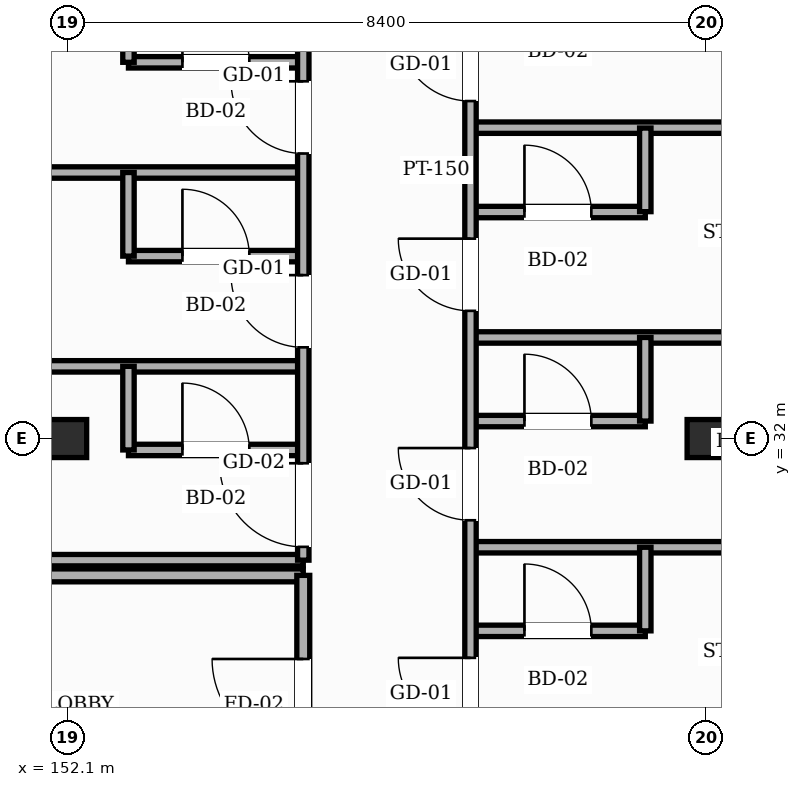
"""IFC4 building model, lengths in metres.
Left out: names, types, materials, properties, quantities, classifications, styles, units other than length and angle.
Written with IfcOpenShell. Run it as: python <this file> out.ifc"""

import sys

from ifc_helpers import new_model, si_unit, direction, frame, frame_2d, origin, origin_2d, place, context, subcontext, project, spatial, rectangle, hollow_rectangle, extrude, element, fill, save


model = new_model("IFC4")
c1 = context("Model", 3, precision=1e-05, world=origin(), true_north=direction((0.0, 1.0)))
c2 = subcontext(c1, "Body", "Model", "MODEL_VIEW")
j1 = project(units=[si_unit("LENGTHUNIT", "METRE"), si_unit("PLANEANGLEUNIT", "RADIAN")], contexts=[c1])
p1 = place(None, origin())
s1 = spatial("IfcSite", under=j1, at=p1, CompositionType="ELEMENT")
p2 = place(p1, origin())
s2 = spatial("IfcBuilding", under=s1, at=p2, CompositionType="ELEMENT")
p3 = place(p2, frame((0.0, 0.0, 35.4)))
s3 = spatial("IfcBuildingStorey", under=s2, at=p3, CompositionType="ELEMENT", Elevation=35.4)
for number, where, z_axis, x_axis in (
    (1, (152.1, 32.0, 0.0), (0.0, 0.0, 1.0), (1.0, 0.0, 0.0)),
    (2, (160.5, 32.0, 0.0), (0.0, 0.0, 1.0), (1.0, 0.0, 0.0)),
):
    element("IfcColumn", number, at=place(p3, frame(where, z_axis=z_axis, x_axis=x_axis)), inside=s3, PredefinedType="COLUMN", context=c2, shape_type="SweptSolid", body=[
        extrude(hollow_rectangle(XDim=0.5, YDim=0.5, WallThickness=0.022, InnerFilletRadius=0.022, OuterFilletRadius=0.044, at=origin_2d()), origin(), (0.0, 0.0, 1.0), 3.6),
    ])
p4 = place(p3, frame((157.4, 29.47, 0.0), z_axis=(0.0, 0.0, 1.0), x_axis=(1.0, 0.0, 0.0)))
e3 = element("IfcWall", 3, at=p4, inside=s3, PredefinedType="PARTITIONING", context=c2, shape_type="SweptSolid", body=[
    extrude(rectangle(XDim=2.3, YDim=0.15, at=frame_2d((1.15, 0.0))), origin(), (0.0, 0.0, 1.0), 3.365),
])
p5 = place(p4, frame((0.71, 0.0, 0.0)))
e4 = element("IfcOpeningElement", 4, at=p5, cuts=e3, PredefinedType="OPENING", context=c2, shape_type="SweptSolid", body=[
    extrude(rectangle(XDim=0.88, YDim=2.12, at=frame_2d((0.44, 1.06))), frame((0.0, 0.085, 0.0), z_axis=(0.0, -1.0, 0.0), x_axis=(1.0, 0.0, 0.0)), (0.0, 0.0, 1.0), 0.17),
])
p6 = place(p3, frame((147.8, 30.2, 0.0), z_axis=(0.0, 0.0, 1.0), x_axis=(1.0, 0.0, 0.0)))
e5 = element("IfcWall", 5, at=p6, inside=s3, PredefinedType="PARTITIONING", context=c2, shape_type="SweptSolid", body=[
    extrude(rectangle(XDim=7.4, YDim=0.17, at=frame_2d((3.7, 0.0))), origin(), (0.0, 0.0, 1.0), 3.365),
])
p7 = place(p3, frame((144.2, 30.4, 0.0), z_axis=(0.0, 0.0, 1.0), x_axis=(1.0, 0.0, 0.0)))
e6 = element("IfcWall", 6, at=p7, inside=s3, PredefinedType="PARTITIONING", context=c2, shape_type="SweptSolid", body=[
    extrude(rectangle(XDim=11.0, YDim=0.15, at=frame_2d((5.5, 0.0))), origin(), (0.0, 0.0, 1.0), 3.365),
])
p8 = place(p3, frame((157.4, 30.57, 0.0), z_axis=(0.0, 0.0, 1.0), x_axis=(1.0, 0.0, 0.0)))
e7 = element("IfcWall", 7, at=p8, inside=s3, PredefinedType="PARTITIONING", context=c2, shape_type="SweptSolid", body=[
    extrude(rectangle(XDim=9.8, YDim=0.15, at=frame_2d((4.9, 0.0))), origin(), (0.0, 0.0, 1.0), 3.365),
])
p9 = place(p3, frame((152.9, 31.85, 0.0), z_axis=(0.0, 0.0, 1.0), x_axis=(1.0, 0.0, 0.0)))
e8 = element("IfcWall", 8, at=p9, inside=s3, PredefinedType="PARTITIONING", context=c2, shape_type="SweptSolid", body=[
    extrude(rectangle(XDim=2.3, YDim=0.15, at=frame_2d((1.15, 0.0))), origin(), (0.0, 0.0, 1.0), 2.755),
])
p10 = place(p9, frame((0.71, 0.0, 0.0)))
e9 = element("IfcOpeningElement", 9, at=p10, cuts=e8, PredefinedType="OPENING", context=c2, shape_type="SweptSolid", body=[
    extrude(rectangle(XDim=0.88, YDim=2.12, at=frame_2d((0.44, 1.06))), frame((0.0, 0.085, 0.0), z_axis=(0.0, -1.0, 0.0), x_axis=(1.0, 0.0, 0.0)), (0.0, 0.0, 1.0), 0.17),
])
p11 = place(p3, frame((157.4, 32.23, 0.0), z_axis=(0.0, 0.0, 1.0), x_axis=(1.0, 0.0, 0.0)))
e10 = element("IfcWall", 10, at=p11, inside=s3, PredefinedType="PARTITIONING", context=c2, shape_type="SweptSolid", body=[
    extrude(rectangle(XDim=2.3, YDim=0.15, at=frame_2d((1.15, 0.0))), origin(), (0.0, 0.0, 1.0), 2.755),
])
p12 = place(p11, frame((0.71, 0.0, 0.0)))
e11 = element("IfcOpeningElement", 11, at=p12, cuts=e10, PredefinedType="OPENING", context=c2, shape_type="SweptSolid", body=[
    extrude(rectangle(XDim=0.88, YDim=2.12, at=frame_2d((0.44, 1.06))), frame((0.0, 0.085, 0.0), z_axis=(0.0, -1.0, 0.0), x_axis=(1.0, 0.0, 0.0)), (0.0, 0.0, 1.0), 0.17),
])
p13 = place(p3, frame((144.2, 32.95, 0.0), z_axis=(0.0, 0.0, 1.0), x_axis=(1.0, 0.0, 0.0)))
e12 = element("IfcWall", 12, at=p13, inside=s3, PredefinedType="PARTITIONING", context=c2, shape_type="SweptSolid", body=[
    extrude(rectangle(XDim=11.0, YDim=0.15, at=frame_2d((5.5, 0.0))), origin(), (0.0, 0.0, 1.0), 3.365),
])
p14 = place(p3, frame((157.4, 33.33, 0.0), z_axis=(0.0, 0.0, 1.0), x_axis=(1.0, 0.0, 0.0)))
e13 = element("IfcWall", 13, at=p14, inside=s3, PredefinedType="PARTITIONING", context=c2, shape_type="SweptSolid", body=[
    extrude(rectangle(XDim=9.8, YDim=0.15, at=frame_2d((4.9, 0.0))), origin(), (0.0, 0.0, 1.0), 3.365),
])
p15 = place(p3, frame((152.9, 34.4, 0.0), z_axis=(0.0, 0.0, 1.0), x_axis=(1.0, 0.0, 0.0)))
e14 = element("IfcWall", 14, at=p15, inside=s3, PredefinedType="PARTITIONING", context=c2, shape_type="SweptSolid", body=[
    extrude(rectangle(XDim=2.3, YDim=0.15, at=frame_2d((1.15, 0.0))), origin(), (0.0, 0.0, 1.0), 3.365),
])
p16 = place(p15, frame((0.71, 0.0, 0.0)))
e15 = element("IfcOpeningElement", 15, at=p16, cuts=e14, PredefinedType="OPENING", context=c2, shape_type="SweptSolid", body=[
    extrude(rectangle(XDim=0.88, YDim=2.12, at=frame_2d((0.44, 1.06))), frame((0.0, 0.085, 0.0), z_axis=(0.0, -1.0, 0.0), x_axis=(1.0, 0.0, 0.0)), (0.0, 0.0, 1.0), 0.17),
])
p17 = place(p3, frame((157.4, 34.98, 0.0), z_axis=(0.0, 0.0, 1.0), x_axis=(1.0, 0.0, 0.0)))
e16 = element("IfcWall", 16, at=p17, inside=s3, PredefinedType="PARTITIONING", context=c2, shape_type="SweptSolid", body=[
    extrude(rectangle(XDim=2.3, YDim=0.15, at=frame_2d((1.15, 0.0))), origin(), (0.0, 0.0, 1.0), 3.365),
])
p18 = place(p17, frame((0.71, 0.0, 0.0)))
e17 = element("IfcOpeningElement", 17, at=p18, cuts=e16, PredefinedType="OPENING", context=c2, shape_type="SweptSolid", body=[
    extrude(rectangle(XDim=0.88, YDim=2.12, at=frame_2d((0.44, 1.06))), frame((0.0, 0.085, 0.0), z_axis=(0.0, -1.0, 0.0), x_axis=(1.0, 0.0, 0.0)), (0.0, 0.0, 1.0), 0.17),
])
p19 = place(p3, frame((144.2, 35.5, 0.0), z_axis=(0.0, 0.0, 1.0), x_axis=(1.0, 0.0, 0.0)))
e18 = element("IfcWall", 18, at=p19, inside=s3, PredefinedType="PARTITIONING", context=c2, shape_type="SweptSolid", body=[
    extrude(rectangle(XDim=11.0, YDim=0.15, at=frame_2d((5.5, 0.0))), origin(), (0.0, 0.0, 1.0), 3.365),
])
p20 = place(p3, frame((157.4, 36.09, 0.0), z_axis=(0.0, 0.0, 1.0), x_axis=(1.0, 0.0, 0.0)))
e19 = element("IfcWall", 19, at=p20, inside=s3, PredefinedType="PARTITIONING", context=c2, shape_type="SweptSolid", body=[
    extrude(rectangle(XDim=9.8, YDim=0.15, at=frame_2d((4.9, 0.0))), origin(), (0.0, 0.0, 1.0), 3.365),
])
p21 = place(p3, frame((152.9, 36.95, 0.0), z_axis=(0.0, 0.0, 1.0), x_axis=(1.0, 0.0, 0.0)))
e20 = element("IfcWall", 20, at=p21, inside=s3, PredefinedType="PARTITIONING", context=c2, shape_type="SweptSolid", body=[
    extrude(rectangle(XDim=2.3, YDim=0.15, at=frame_2d((1.15, 0.0))), origin(), (0.0, 0.0, 1.0), 3.365),
])
p22 = place(p21, frame((0.71, 0.0, 0.0)))
e21 = element("IfcOpeningElement", 21, at=p22, cuts=e20, PredefinedType="OPENING", context=c2, shape_type="SweptSolid", body=[
    extrude(rectangle(XDim=0.88, YDim=2.12, at=frame_2d((0.44, 1.06))), frame((0.0, 0.085, 0.0), z_axis=(0.0, -1.0, 0.0), x_axis=(1.0, 0.0, 0.0)), (0.0, 0.0, 1.0), 0.17),
])
p23 = place(p3, frame((152.9, 31.85, 0.0), z_axis=(0.0, 0.0, 1.0), x_axis=(0.0, 1.0, 0.0)))
e22 = element("IfcWall", 22, at=p23, inside=s3, PredefinedType="PARTITIONING", context=c2, shape_type="SweptSolid", body=[
    extrude(rectangle(XDim=1.1, YDim=0.15, at=frame_2d((0.55, 0.0))), origin(), (0.0, 0.0, 1.0), 3.365),
])
for number, where, z_axis, x_axis in (
    (23, (152.9, 34.4, 0.0), (0.0, 0.0, 1.0), (0.0, 1.0, 0.0)),
    (24, (152.9, 36.95, 0.0), (0.0, 0.0, 1.0), (0.0, 1.0, 0.0)),
):
    element("IfcWall", number, at=place(p3, frame(where, z_axis=z_axis, x_axis=x_axis)), inside=s3, PredefinedType="PARTITIONING", context=c2, shape_type="SweptSolid", body=[
        extrude(rectangle(XDim=1.1, YDim=0.15, at=frame_2d((0.55, 0.0))), origin(), (0.0, 0.0, 1.0), 3.365),
    ])
p24 = place(p3, frame((155.2, 26.8, 0.0), z_axis=(0.0, 0.0, 1.0), x_axis=(0.0, 1.0, 0.0)))
e25 = element("IfcWall", 25, at=p24, inside=s3, PredefinedType="PARTITIONING", context=c2, shape_type="SweptSolid", body=[
    extrude(rectangle(XDim=3.4, YDim=0.17, at=frame_2d((1.7, 0.0))), origin(), (0.0, 0.0, 1.0), 3.365),
])
p25 = place(p24, frame((1.1, 0.0, 0.0)))
e26 = element("IfcOpeningElement", 26, at=p25, cuts=e25, PredefinedType="OPENING", context=c2, shape_type="SweptSolid", body=[
    extrude(rectangle(XDim=1.2, YDim=2.2, at=frame_2d((0.6, 1.1))), frame((0.0, 0.095, 0.0), z_axis=(0.0, -1.0, 0.0), x_axis=(1.0, 0.0, 0.0)), (0.0, 0.0, 1.0), 0.19),
])
p26 = place(p3, frame((155.2, 30.4, 0.0), z_axis=(0.0, 0.0, 1.0), x_axis=(0.0, 1.0, 0.0)))
e27 = element("IfcWall", 27, at=p26, inside=s3, PredefinedType="PARTITIONING", context=c2, shape_type="SweptSolid", body=[
    extrude(rectangle(XDim=10.2, YDim=0.15, at=frame_2d((5.1, 0.0))), origin(), (0.0, 0.0, 1.0), 3.365),
])
p27 = place(p26, frame((0.175, 0.0, 0.0)))
e28 = element("IfcOpeningElement", 28, at=p27, cuts=e27, PredefinedType="OPENING", context=c2, shape_type="SweptSolid", body=[
    extrude(rectangle(XDim=1.1, YDim=2.2, at=frame_2d((0.55, 1.1))), frame((0.0, 0.085, 0.0), z_axis=(0.0, -1.0, 0.0), x_axis=(1.0, 0.0, 0.0)), (0.0, 0.0, 1.0), 0.17),
])
p28 = place(p26, frame((2.8, 0.0, 0.0)))
e29 = element("IfcOpeningElement", 29, at=p28, cuts=e27, PredefinedType="OPENING", context=c2, shape_type="SweptSolid", body=[
    extrude(rectangle(XDim=0.95, YDim=2.15, at=frame_2d((0.475, 1.075))), frame((0.0, 0.085, 0.0), z_axis=(0.0, -1.0, 0.0), x_axis=(1.0, 0.0, 0.0)), (0.0, 0.0, 1.0), 0.17),
])
p29 = place(p26, frame((5.35, 0.0, 0.0)))
e30 = element("IfcOpeningElement", 30, at=p29, cuts=e27, PredefinedType="OPENING", context=c2, shape_type="SweptSolid", body=[
    extrude(rectangle(XDim=0.95, YDim=2.15, at=frame_2d((0.475, 1.075))), frame((0.0, 0.085, 0.0), z_axis=(0.0, -1.0, 0.0), x_axis=(1.0, 0.0, 0.0)), (0.0, 0.0, 1.0), 0.17),
])
p30 = place(p26, frame((7.9, 0.0, 0.0)))
e31 = element("IfcOpeningElement", 31, at=p30, cuts=e27, PredefinedType="OPENING", context=c2, shape_type="SweptSolid", body=[
    extrude(rectangle(XDim=0.95, YDim=2.15, at=frame_2d((0.475, 1.075))), frame((0.0, 0.085, 0.0), z_axis=(0.0, -1.0, 0.0), x_axis=(1.0, 0.0, 0.0)), (0.0, 0.0, 1.0), 0.17),
])
p31 = place(p3, frame((157.4, 22.3, 0.0), z_axis=(0.0, 0.0, 1.0), x_axis=(0.0, 1.0, 0.0)))
e32 = element("IfcWall", 32, at=p31, inside=s3, PredefinedType="PARTITIONING", context=c2, shape_type="SweptSolid", body=[
    extrude(rectangle(XDim=48.5, YDim=0.15, at=frame_2d((24.25, 0.0))), origin(), (0.0, 0.0, 1.0), 3.365),
])
p32 = place(p31, frame((24.875, 0.0, 0.0)))
e33 = element("IfcOpeningElement", 33, at=p32, cuts=e32, PredefinedType="OPENING", context=c2, shape_type="SweptSolid", body=[
    extrude(rectangle(XDim=1.65, YDim=2.35, at=frame_2d((0.825, 1.175))), frame((0.0, 0.085, 0.0), z_axis=(0.0, -1.0, 0.0), x_axis=(1.0, 0.0, 0.0)), (0.0, 0.0, 1.0), 0.17),
])
p33 = place(p31, frame((0.275, 0.0, 0.0)))
e34 = element("IfcOpeningElement", 34, at=p33, cuts=e32, PredefinedType="OPENING", context=c2, shape_type="SweptSolid", body=[
    extrude(rectangle(XDim=1.1, YDim=2.2, at=frame_2d((0.55, 1.1))), frame((0.0, 0.085, 0.0), z_axis=(0.0, -1.0, 0.0), x_axis=(1.0, 0.0, 0.0)), (0.0, 0.0, 1.0), 0.17),
])
p34 = place(p31, frame((3.11, 0.0, 0.0)))
e35 = element("IfcOpeningElement", 35, at=p34, cuts=e32, PredefinedType="OPENING", context=c2, shape_type="SweptSolid", body=[
    extrude(rectangle(XDim=0.95, YDim=2.15, at=frame_2d((0.475, 1.075))), frame((0.0, 0.085, 0.0), z_axis=(0.0, -1.0, 0.0), x_axis=(1.0, 0.0, 0.0)), (0.0, 0.0, 1.0), 0.17),
])
p35 = place(p31, frame((5.865, 0.0, 0.0)))
e36 = element("IfcOpeningElement", 36, at=p35, cuts=e32, PredefinedType="OPENING", context=c2, shape_type="SweptSolid", body=[
    extrude(rectangle(XDim=0.95, YDim=2.15, at=frame_2d((0.475, 1.075))), frame((0.0, 0.085, 0.0), z_axis=(0.0, -1.0, 0.0), x_axis=(1.0, 0.0, 0.0)), (0.0, 0.0, 1.0), 0.17),
])
p36 = place(p31, frame((8.625, 0.0, 0.0)))
e37 = element("IfcOpeningElement", 37, at=p36, cuts=e32, PredefinedType="OPENING", context=c2, shape_type="SweptSolid", body=[
    extrude(rectangle(XDim=0.95, YDim=2.15, at=frame_2d((0.475, 1.075))), frame((0.0, 0.085, 0.0), z_axis=(0.0, -1.0, 0.0), x_axis=(1.0, 0.0, 0.0)), (0.0, 0.0, 1.0), 0.17),
])
p37 = place(p31, frame((11.38, 0.0, 0.0)))
e38 = element("IfcOpeningElement", 38, at=p37, cuts=e32, PredefinedType="OPENING", context=c2, shape_type="SweptSolid", body=[
    extrude(rectangle(XDim=0.95, YDim=2.15, at=frame_2d((0.475, 1.075))), frame((0.0, 0.085, 0.0), z_axis=(0.0, -1.0, 0.0), x_axis=(1.0, 0.0, 0.0)), (0.0, 0.0, 1.0), 0.17),
])
p38 = place(p31, frame((14.14, 0.0, 0.0)))
e39 = element("IfcOpeningElement", 39, at=p38, cuts=e32, PredefinedType="OPENING", context=c2, shape_type="SweptSolid", body=[
    extrude(rectangle(XDim=0.95, YDim=2.15, at=frame_2d((0.475, 1.075))), frame((0.0, 0.085, 0.0), z_axis=(0.0, -1.0, 0.0), x_axis=(1.0, 0.0, 0.0)), (0.0, 0.0, 1.0), 0.17),
])
p39 = place(p31, frame((16.895, 0.0, 0.0)))
e40 = element("IfcOpeningElement", 40, at=p39, cuts=e32, PredefinedType="OPENING", context=c2, shape_type="SweptSolid", body=[
    extrude(rectangle(XDim=0.95, YDim=2.15, at=frame_2d((0.475, 1.075))), frame((0.0, 0.085, 0.0), z_axis=(0.0, -1.0, 0.0), x_axis=(1.0, 0.0, 0.0)), (0.0, 0.0, 1.0), 0.17),
])
p40 = place(p31, frame((32.37, 0.0, 0.0)))
e41 = element("IfcOpeningElement", 41, at=p40, cuts=e32, PredefinedType="OPENING", context=c2, shape_type="SweptSolid", body=[
    extrude(rectangle(XDim=1.1, YDim=2.2, at=frame_2d((0.55, 1.1))), frame((0.0, 0.085, 0.0), z_axis=(0.0, -1.0, 0.0), x_axis=(1.0, 0.0, 0.0)), (0.0, 0.0, 1.0), 0.17),
])
p41 = place(p31, frame((35.175, 0.0, 0.0)))
e42 = element("IfcOpeningElement", 42, at=p41, cuts=e32, PredefinedType="OPENING", context=c2, shape_type="SweptSolid", body=[
    extrude(rectangle(XDim=0.95, YDim=2.15, at=frame_2d((0.475, 1.075))), frame((0.0, 0.085, 0.0), z_axis=(0.0, -1.0, 0.0), x_axis=(1.0, 0.0, 0.0)), (0.0, 0.0, 1.0), 0.17),
])
p42 = place(p31, frame((37.91, 0.0, 0.0)))
e43 = element("IfcOpeningElement", 43, at=p42, cuts=e32, PredefinedType="OPENING", context=c2, shape_type="SweptSolid", body=[
    extrude(rectangle(XDim=0.95, YDim=2.15, at=frame_2d((0.475, 1.075))), frame((0.0, 0.085, 0.0), z_axis=(0.0, -1.0, 0.0), x_axis=(1.0, 0.0, 0.0)), (0.0, 0.0, 1.0), 0.17),
])
p43 = place(p31, frame((40.64, 0.0, 0.0)))
e44 = element("IfcOpeningElement", 44, at=p43, cuts=e32, PredefinedType="OPENING", context=c2, shape_type="SweptSolid", body=[
    extrude(rectangle(XDim=0.95, YDim=2.15, at=frame_2d((0.475, 1.075))), frame((0.0, 0.085, 0.0), z_axis=(0.0, -1.0, 0.0), x_axis=(1.0, 0.0, 0.0)), (0.0, 0.0, 1.0), 0.17),
])
p44 = place(p31, frame((43.375, 0.0, 0.0)))
e45 = element("IfcOpeningElement", 45, at=p44, cuts=e32, PredefinedType="OPENING", context=c2, shape_type="SweptSolid", body=[
    extrude(rectangle(XDim=0.95, YDim=2.15, at=frame_2d((0.475, 1.075))), frame((0.0, 0.085, 0.0), z_axis=(0.0, -1.0, 0.0), x_axis=(1.0, 0.0, 0.0)), (0.0, 0.0, 1.0), 0.17),
])
p45 = place(p31, frame((46.11, 0.0, 0.0)))
e46 = element("IfcOpeningElement", 46, at=p45, cuts=e32, PredefinedType="OPENING", context=c2, shape_type="SweptSolid", body=[
    extrude(rectangle(XDim=0.95, YDim=2.15, at=frame_2d((0.475, 1.075))), frame((0.0, 0.085, 0.0), z_axis=(0.0, -1.0, 0.0), x_axis=(1.0, 0.0, 0.0)), (0.0, 0.0, 1.0), 0.17),
])
for number, where, z_axis, x_axis in (
    (47, (159.7, 29.47, 0.0), (0.0, 0.0, 1.0), (0.0, 1.0, 0.0)),
    (48, (159.7, 32.23, 0.0), (0.0, 0.0, 1.0), (0.0, 1.0, 0.0)),
):
    element("IfcWall", number, at=place(p3, frame(where, z_axis=z_axis, x_axis=x_axis)), inside=s3, PredefinedType="PARTITIONING", context=c2, shape_type="SweptSolid", body=[
        extrude(rectangle(XDim=1.1, YDim=0.15, at=frame_2d((0.55, 0.0))), origin(), (0.0, 0.0, 1.0), 3.365),
    ])
p46 = place(p3, frame((159.7, 34.985, 0.0), z_axis=(0.0, 0.0, 1.0), x_axis=(0.0, 1.0, 0.0)))
e49 = element("IfcWall", 49, at=p46, inside=s3, PredefinedType="PARTITIONING", context=c2, shape_type="SweptSolid", body=[
    extrude(rectangle(XDim=1.1, YDim=0.15, at=frame_2d((0.55, 0.0))), origin(), (0.0, 0.0, 1.0), 3.365),
])
p47 = place(p25, origin())
e50 = element("IfcDoor", 50, at=p47, inside=s3, OperationType="SINGLE_SWING_RIGHT", PredefinedType="DOOR", context=c2, shape_type="SweptSolid", body=[
    extrude(rectangle(XDim=1.2, YDim=2.2, at=frame_2d((0.6, 1.1))), frame((0.0, 0.025, 0.0), z_axis=(0.0, -1.0, 0.0), x_axis=(1.0, 0.0, 0.0)), (0.0, 0.0, 1.0), 0.05),
])
fill(e26, e50)
p48 = place(p27, origin())
e51 = element("IfcDoor", 51, at=p48, inside=s3, OperationType="SINGLE_SWING_RIGHT", PredefinedType="DOOR", context=c2, shape_type="SweptSolid", body=[
    extrude(rectangle(XDim=1.1, YDim=2.2, at=frame_2d((0.55, 1.1))), frame((0.0, 0.025, 0.0), z_axis=(0.0, -1.0, 0.0), x_axis=(1.0, 0.0, 0.0)), (0.0, 0.0, 1.0), 0.05),
])
fill(e28, e51)
p49 = place(p10, origin())
e52 = element("IfcDoor", 52, at=p49, inside=s3, OperationType="SINGLE_SWING_LEFT", PredefinedType="DOOR", context=c2, shape_type="SweptSolid", body=[
    extrude(rectangle(XDim=0.88, YDim=2.12, at=frame_2d((0.44, 1.06))), frame((0.0, 0.025, 0.0), z_axis=(0.0, -1.0, 0.0), x_axis=(1.0, 0.0, 0.0)), (0.0, 0.0, 1.0), 0.05),
])
fill(e9, e52)
p50 = place(p28, origin())
e53 = element("IfcDoor", 53, at=p50, inside=s3, OperationType="SINGLE_SWING_RIGHT", PredefinedType="DOOR", context=c2, shape_type="SweptSolid", body=[
    extrude(rectangle(XDim=0.95, YDim=2.15, at=frame_2d((0.475, 1.075))), frame((0.0, 0.025, 0.0), z_axis=(0.0, -1.0, 0.0), x_axis=(1.0, 0.0, 0.0)), (0.0, 0.0, 1.0), 0.05),
])
fill(e29, e53)
p51 = place(p16, origin())
e54 = element("IfcDoor", 54, at=p51, inside=s3, OperationType="SINGLE_SWING_LEFT", PredefinedType="DOOR", context=c2, shape_type="SweptSolid", body=[
    extrude(rectangle(XDim=0.88, YDim=2.12, at=frame_2d((0.44, 1.06))), frame((0.0, 0.025, 0.0), z_axis=(0.0, -1.0, 0.0), x_axis=(1.0, 0.0, 0.0)), (0.0, 0.0, 1.0), 0.05),
])
fill(e15, e54)
p52 = place(p29, origin())
e55 = element("IfcDoor", 55, at=p52, inside=s3, OperationType="SINGLE_SWING_RIGHT", PredefinedType="DOOR", context=c2, shape_type="SweptSolid", body=[
    extrude(rectangle(XDim=0.95, YDim=2.15, at=frame_2d((0.475, 1.075))), frame((0.0, 0.025, 0.0), z_axis=(0.0, -1.0, 0.0), x_axis=(1.0, 0.0, 0.0)), (0.0, 0.0, 1.0), 0.05),
])
fill(e30, e55)
p53 = place(p22, origin())
e56 = element("IfcDoor", 56, at=p53, inside=s3, OperationType="SINGLE_SWING_LEFT", PredefinedType="DOOR", context=c2, shape_type="SweptSolid", body=[
    extrude(rectangle(XDim=0.88, YDim=2.12, at=frame_2d((0.44, 1.06))), frame((0.0, 0.025, 0.0), z_axis=(0.0, -1.0, 0.0), x_axis=(1.0, 0.0, 0.0)), (0.0, 0.0, 1.0), 0.05),
])
fill(e21, e56)
p54 = place(p35, origin())
e57 = element("IfcDoor", 57, at=p54, inside=s3, OperationType="SINGLE_SWING_RIGHT", PredefinedType="DOOR", context=c2, shape_type="SweptSolid", body=[
    extrude(rectangle(XDim=0.95, YDim=2.15, at=frame_2d((0.475, 1.075))), frame((0.0, 0.025, 0.0), z_axis=(0.0, -1.0, 0.0), x_axis=(1.0, 0.0, 0.0)), (0.0, 0.0, 1.0), 0.05),
])
fill(e36, e57)
p55 = place(p5, origin())
e58 = element("IfcDoor", 58, at=p55, inside=s3, OperationType="SINGLE_SWING_LEFT", PredefinedType="DOOR", context=c2, shape_type="SweptSolid", body=[
    extrude(rectangle(XDim=0.88, YDim=2.12, at=frame_2d((0.44, 1.06))), frame((0.0, 0.025, 0.0), z_axis=(0.0, -1.0, 0.0), x_axis=(1.0, 0.0, 0.0)), (0.0, 0.0, 1.0), 0.05),
])
fill(e4, e58)
p56 = place(p36, origin())
e59 = element("IfcDoor", 59, at=p56, inside=s3, OperationType="SINGLE_SWING_RIGHT", PredefinedType="DOOR", context=c2, shape_type="SweptSolid", body=[
    extrude(rectangle(XDim=0.95, YDim=2.15, at=frame_2d((0.475, 1.075))), frame((0.0, 0.025, 0.0), z_axis=(0.0, -1.0, 0.0), x_axis=(1.0, 0.0, 0.0)), (0.0, 0.0, 1.0), 0.05),
])
fill(e37, e59)
p57 = place(p12, origin())
e60 = element("IfcDoor", 60, at=p57, inside=s3, OperationType="SINGLE_SWING_LEFT", PredefinedType="DOOR", context=c2, shape_type="SweptSolid", body=[
    extrude(rectangle(XDim=0.88, YDim=2.12, at=frame_2d((0.44, 1.06))), frame((0.0, 0.025, 0.0), z_axis=(0.0, -1.0, 0.0), x_axis=(1.0, 0.0, 0.0)), (0.0, 0.0, 1.0), 0.05),
])
fill(e11, e60)
p58 = place(p37, origin())
e61 = element("IfcDoor", 61, at=p58, inside=s3, OperationType="SINGLE_SWING_RIGHT", PredefinedType="DOOR", context=c2, shape_type="SweptSolid", body=[
    extrude(rectangle(XDim=0.95, YDim=2.15, at=frame_2d((0.475, 1.075))), frame((0.0, 0.025, 0.0), z_axis=(0.0, -1.0, 0.0), x_axis=(1.0, 0.0, 0.0)), (0.0, 0.0, 1.0), 0.05),
])
fill(e38, e61)
p59 = place(p18, origin())
e62 = element("IfcDoor", 62, at=p59, inside=s3, OperationType="SINGLE_SWING_LEFT", PredefinedType="DOOR", context=c2, shape_type="SweptSolid", body=[
    extrude(rectangle(XDim=0.88, YDim=2.12, at=frame_2d((0.44, 1.06))), frame((0.0, 0.025, 0.0), z_axis=(0.0, -1.0, 0.0), x_axis=(1.0, 0.0, 0.0)), (0.0, 0.0, 1.0), 0.05),
])
fill(e17, e62)
p60 = place(p38, origin())
e63 = element("IfcDoor", 63, at=p60, inside=s3, OperationType="SINGLE_SWING_RIGHT", PredefinedType="DOOR", context=c2, shape_type="SweptSolid", body=[
    extrude(rectangle(XDim=0.95, YDim=2.15, at=frame_2d((0.475, 1.075))), frame((0.0, 0.025, 0.0), z_axis=(0.0, -1.0, 0.0), x_axis=(1.0, 0.0, 0.0)), (0.0, 0.0, 1.0), 0.05),
])
fill(e39, e63)
save(model, sys.argv[1])
